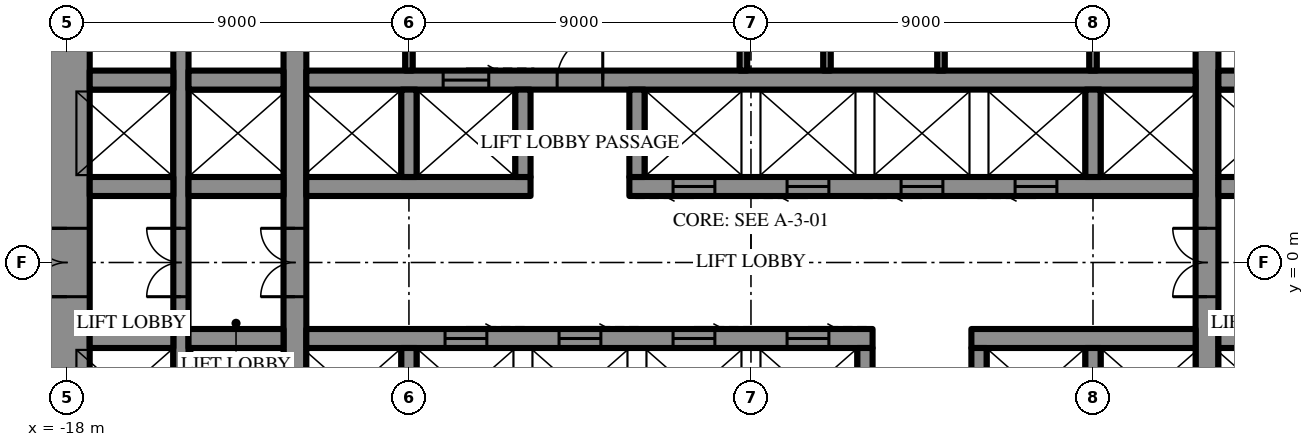
"""IFC4 building model, lengths in metres.
Left out: names, types, materials, properties, quantities, classifications, styles, units other than length and angle.
Written with IfcOpenShell. Run it as: python <this file> out.ifc"""

import sys

from ifc_helpers import new_model, si_unit, direction, frame, frame_2d, origin, place, context, subcontext, project, spatial, rectangle, extrude, element, fill, save


model = new_model("IFC4")
c1 = context("Model", 3, precision=1e-05, world=origin(), true_north=direction((0.0, 1.0)))
c2 = subcontext(c1, "Body", "Model", "MODEL_VIEW")
j1 = project(units=[si_unit("LENGTHUNIT", "METRE"), si_unit("PLANEANGLEUNIT", "RADIAN")], contexts=[c1])
p1 = place(None, origin())
s1 = spatial("IfcSite", under=j1, at=p1, CompositionType="ELEMENT")
p2 = place(p1, origin())
s2 = spatial("IfcBuilding", under=s1, at=p2, CompositionType="ELEMENT")
p3 = place(p2, frame((0.0, 0.0, 73.9)))
s3 = spatial("IfcBuildingStorey", under=s2, at=p3, CompositionType="ELEMENT", Elevation=73.9)
p4 = place(p3, frame((-18.0, 10.7, 0.0), z_axis=(0.0, 0.0, 1.0), x_axis=(0.0, -1.0, 0.0)))
e1 = element("IfcWall", 1, at=p4, inside=s3, PredefinedType="SHEAR", context=c2, shape_type="SweptSolid", body=[
    extrude(rectangle(XDim=21.4, YDim=1.2, at=frame_2d((10.7, 0.0))), origin(), (0.0, 0.0, 1.0), 4.2),
])
p5 = place(p4, frame((9.8, 0.0, 0.0)))
e2 = element("IfcOpeningElement", 2, at=p5, cuts=e1, PredefinedType="OPENING", context=c2, shape_type="SweptSolid", body=[
    extrude(rectangle(XDim=1.8, YDim=2.4, at=frame_2d((0.9, 1.2))), frame((0.0, 0.61, 0.0), z_axis=(0.0, -1.0, 0.0), x_axis=(1.0, 0.0, 0.0)), (0.0, 0.0, 1.0), 1.22),
])
p6 = place(p3, frame((12.0, -10.7, 0.0), z_axis=(0.0, 0.0, 1.0), x_axis=(0.0, 1.0, 0.0)))
e3 = element("IfcWall", 3, at=p6, inside=s3, PredefinedType="SHEAR", context=c2, shape_type="SweptSolid", body=[
    extrude(rectangle(XDim=21.4, YDim=0.6, at=frame_2d((10.7, 0.0))), origin(), (0.0, 0.0, 1.0), 4.2),
])
p7 = place(p6, frame((9.8, 0.0, 0.0)))
e4 = element("IfcOpeningElement", 4, at=p7, cuts=e3, PredefinedType="OPENING", context=c2, shape_type="SweptSolid", body=[
    extrude(rectangle(XDim=1.8, YDim=2.4, at=frame_2d((0.9, 1.2))), frame((0.0, 0.31, 0.0), z_axis=(0.0, -1.0, 0.0), x_axis=(1.0, 0.0, 0.0)), (0.0, 0.0, 1.0), 0.62),
])
p8 = place(p3, frame((-12.0, -10.7, 0.0), z_axis=(0.0, 0.0, 1.0), x_axis=(0.0, 1.0, 0.0)))
e5 = element("IfcWall", 5, at=p8, inside=s3, PredefinedType="SHEAR", context=c2, shape_type="SweptSolid", body=[
    extrude(rectangle(XDim=21.4, YDim=0.6, at=frame_2d((10.7, 0.0))), origin(), (0.0, 0.0, 1.0), 4.2),
])
p9 = place(p8, frame((9.8, 0.0, 0.0)))
e6 = element("IfcOpeningElement", 6, at=p9, cuts=e5, PredefinedType="OPENING", context=c2, shape_type="SweptSolid", body=[
    extrude(rectangle(XDim=1.8, YDim=2.4, at=frame_2d((0.9, 1.2))), frame((0.0, 0.31, 0.0), z_axis=(0.0, -1.0, 0.0), x_axis=(1.0, 0.0, 0.0)), (0.0, 0.0, 1.0), 0.62),
])
p10 = place(p3, frame((-15.0, -10.7, 0.0), z_axis=(0.0, 0.0, 1.0), x_axis=(0.0, 1.0, 0.0)))
e7 = element("IfcWall", 7, at=p10, inside=s3, PredefinedType="SHEAR", context=c2, shape_type="SweptSolid", body=[
    extrude(rectangle(XDim=21.4, YDim=0.4, at=frame_2d((10.7, 0.0))), origin(), (0.0, 0.0, 1.0), 4.2),
])
p11 = place(p10, frame((9.8, 0.0, 0.0)))
e8 = element("IfcOpeningElement", 8, at=p11, cuts=e7, PredefinedType="OPENING", context=c2, shape_type="SweptSolid", body=[
    extrude(rectangle(XDim=1.8, YDim=2.4, at=frame_2d((0.9, 1.2))), frame((0.0, 0.21, 0.0), z_axis=(0.0, -1.0, 0.0), x_axis=(1.0, 0.0, 0.0)), (0.0, 0.0, 1.0), 0.42),
])
p12 = place(p3, frame((-17.4, 2.0, 0.0), z_axis=(0.0, 0.0, 1.0), x_axis=(1.0, 0.0, 0.0)))
e9 = element("IfcWall", 9, at=p12, inside=s3, PredefinedType="SHEAR", context=c2, shape_type="SweptSolid", body=[
    extrude(rectangle(XDim=2.2, YDim=0.5, at=frame_2d((1.1, 0.0))), origin(), (0.0, 0.0, 1.0), 4.2),
])
p13 = place(p3, frame((-14.8, 2.0, 0.0), z_axis=(0.0, 0.0, 1.0), x_axis=(1.0, 0.0, 0.0)))
e10 = element("IfcWall", 10, at=p13, inside=s3, PredefinedType="SHEAR", context=c2, shape_type="SweptSolid", body=[
    extrude(rectangle(XDim=2.5, YDim=0.5, at=frame_2d((1.25, 0.0))), origin(), (0.0, 0.0, 1.0), 4.2),
])
p14 = place(p3, frame((-11.7, 2.0, 0.0), z_axis=(0.0, 0.0, 1.0), x_axis=(1.0, 0.0, 0.0)))
e11 = element("IfcWall", 11, at=p14, inside=s3, PredefinedType="SHEAR", context=c2, shape_type="SweptSolid", body=[
    extrude(rectangle(XDim=5.9, YDim=0.5, at=frame_2d((2.95, 0.0))), origin(), (0.0, 0.0, 1.0), 4.2),
])
p15 = place(p3, frame((-3.2, 2.0, 0.0), z_axis=(0.0, 0.0, 1.0), x_axis=(1.0, 0.0, 0.0)))
e12 = element("IfcWall", 12, at=p15, inside=s3, PredefinedType="SHEAR", context=c2, shape_type="SweptSolid", body=[
    extrude(rectangle(XDim=14.9, YDim=0.5, at=frame_2d((7.45, 0.0))), origin(), (0.0, 0.0, 1.0), 4.2),
])
p16 = place(p15, frame((1.15, 0.0, 0.0)))
e13 = element("IfcOpeningElement", 13, at=p16, cuts=e12, PredefinedType="OPENING", context=c2, shape_type="SweptSolid", body=[
    extrude(rectangle(XDim=1.1, YDim=2.2, at=frame_2d((0.55, 1.1))), frame((0.0, 0.26, 0.0), z_axis=(0.0, -1.0, 0.0), x_axis=(1.0, 0.0, 0.0)), (0.0, 0.0, 1.0), 0.52),
])
p17 = place(p15, frame((4.15, 0.0, 0.0)))
e14 = element("IfcOpeningElement", 14, at=p17, cuts=e12, PredefinedType="OPENING", context=c2, shape_type="SweptSolid", body=[
    extrude(rectangle(XDim=1.1, YDim=2.2, at=frame_2d((0.55, 1.1))), frame((0.0, 0.26, 0.0), z_axis=(0.0, -1.0, 0.0), x_axis=(1.0, 0.0, 0.0)), (0.0, 0.0, 1.0), 0.52),
])
p18 = place(p15, frame((7.15, 0.0, 0.0)))
e15 = element("IfcOpeningElement", 15, at=p18, cuts=e12, PredefinedType="OPENING", context=c2, shape_type="SweptSolid", body=[
    extrude(rectangle(XDim=1.1, YDim=2.2, at=frame_2d((0.55, 1.1))), frame((0.0, 0.26, 0.0), z_axis=(0.0, -1.0, 0.0), x_axis=(1.0, 0.0, 0.0)), (0.0, 0.0, 1.0), 0.52),
])
p19 = place(p15, frame((10.15, 0.0, 0.0)))
e16 = element("IfcOpeningElement", 16, at=p19, cuts=e12, PredefinedType="OPENING", context=c2, shape_type="SweptSolid", body=[
    extrude(rectangle(XDim=1.1, YDim=2.2, at=frame_2d((0.55, 1.1))), frame((0.0, 0.26, 0.0), z_axis=(0.0, -1.0, 0.0), x_axis=(1.0, 0.0, 0.0)), (0.0, 0.0, 1.0), 0.52),
])
p20 = place(p3, frame((12.3, 2.0, 0.0), z_axis=(0.0, 0.0, 1.0), x_axis=(1.0, 0.0, 0.0)))
e17 = element("IfcWall", 17, at=p20, inside=s3, PredefinedType="SHEAR", context=c2, shape_type="SweptSolid", body=[
    extrude(rectangle(XDim=2.5, YDim=0.5, at=frame_2d((1.25, 0.0))), origin(), (0.0, 0.0, 1.0), 4.2),
])
p21 = place(p3, frame((-17.4, 4.8, 0.0), z_axis=(0.0, 0.0, 1.0), x_axis=(1.0, 0.0, 0.0)))
e18 = element("IfcWall", 18, at=p21, inside=s3, PredefinedType="SHEAR", context=c2, shape_type="SweptSolid", body=[
    extrude(rectangle(XDim=2.2, YDim=0.5, at=frame_2d((1.1, 0.0))), origin(), (0.0, 0.0, 1.0), 4.2),
])
p22 = place(p3, frame((-14.8, 4.8, 0.0), z_axis=(0.0, 0.0, 1.0), x_axis=(1.0, 0.0, 0.0)))
e19 = element("IfcWall", 19, at=p22, inside=s3, PredefinedType="SHEAR", context=c2, shape_type="SweptSolid", body=[
    extrude(rectangle(XDim=2.5, YDim=0.5, at=frame_2d((1.25, 0.0))), origin(), (0.0, 0.0, 1.0), 4.2),
])
p23 = place(p3, frame((-11.7, 4.8, 0.0), z_axis=(0.0, 0.0, 1.0), x_axis=(1.0, 0.0, 0.0)))
e20 = element("IfcWall", 20, at=p23, inside=s3, PredefinedType="SHEAR", context=c2, shape_type="SweptSolid", body=[
    extrude(rectangle(XDim=23.4, YDim=0.5, at=frame_2d((11.7, 0.0))), origin(), (0.0, 0.0, 1.0), 4.2),
])
p24 = place(p23, frame((6.6, 0.0, 0.0)))
e21 = element("IfcOpeningElement", 21, at=p24, cuts=e20, PredefinedType="OPENING", context=c2, shape_type="SweptSolid", body=[
    extrude(rectangle(XDim=1.2, YDim=2.2, at=frame_2d((0.6, 1.1))), frame((0.0, 0.26, 0.0), z_axis=(0.0, -1.0, 0.0), x_axis=(1.0, 0.0, 0.0)), (0.0, 0.0, 1.0), 0.52),
])
p25 = place(p23, frame((3.6, 0.0, 0.0)))
e22 = element("IfcOpeningElement", 22, at=p25, cuts=e20, PredefinedType="OPENING", context=c2, shape_type="SweptSolid", body=[
    extrude(rectangle(XDim=1.2, YDim=2.2, at=frame_2d((0.6, 1.1))), frame((0.0, 0.26, 0.0), z_axis=(0.0, -1.0, 0.0), x_axis=(1.0, 0.0, 0.0)), (0.0, 0.0, 1.0), 0.52),
])
p26 = place(p3, frame((12.3, 4.8, 0.0), z_axis=(0.0, 0.0, 1.0), x_axis=(1.0, 0.0, 0.0)))
e23 = element("IfcWall", 23, at=p26, inside=s3, PredefinedType="SHEAR", context=c2, shape_type="SweptSolid", body=[
    extrude(rectangle(XDim=2.5, YDim=0.5, at=frame_2d((1.25, 0.0))), origin(), (0.0, 0.0, 1.0), 4.2),
])
for number, where, z_axis, x_axis in (
    (24, (-9.0, 2.25, 0.0), (0.0, 0.0, 1.0), (0.0, 1.0, 0.0)),
    (25, (-6.0, 2.25, 0.0), (0.0, 0.0, 1.0), (0.0, 1.0, 0.0)),
    (26, (-3.0, 2.25, 0.0), (0.0, 0.0, 1.0), (0.0, 1.0, 0.0)),
    (27, (9.0, 2.25, 0.0), (0.0, 0.0, 1.0), (0.0, 1.0, 0.0)),
):
    element("IfcWall", number, at=place(p3, frame(where, z_axis=z_axis, x_axis=x_axis)), inside=s3, PredefinedType="SHEAR", context=c2, shape_type="SweptSolid", body=[
        extrude(rectangle(XDim=2.3, YDim=0.4, at=frame_2d((1.15, 0.0))), origin(), (0.0, 0.0, 1.0), 4.2),
    ])
p27 = place(p3, frame((-0.2, 5.05, 0.0), z_axis=(0.0, 0.0, 1.0), x_axis=(0.0, 1.0, 0.0)))
e28 = element("IfcWall", 28, at=p27, inside=s3, PredefinedType="SHEAR", context=c2, shape_type="SweptSolid", body=[
    extrude(rectangle(XDim=5.65, YDim=0.2, at=frame_2d((2.825, 0.0))), origin(), (0.0, 0.0, 1.0), 4.2),
])
p28 = place(p3, frame((14.8, -2.0, 0.0), z_axis=(0.0, 0.0, 1.0), x_axis=(-1.0, 0.0, 0.0)))
e29 = element("IfcWall", 29, at=p28, inside=s3, PredefinedType="SHEAR", context=c2, shape_type="SweptSolid", body=[
    extrude(rectangle(XDim=2.5, YDim=0.5, at=frame_2d((1.25, 0.0))), origin(), (0.0, 0.0, 1.0), 4.2),
])
p29 = place(p3, frame((11.7, -2.0, 0.0), z_axis=(0.0, 0.0, 1.0), x_axis=(-1.0, 0.0, 0.0)))
e30 = element("IfcWall", 30, at=p29, inside=s3, PredefinedType="SHEAR", context=c2, shape_type="SweptSolid", body=[
    extrude(rectangle(XDim=5.9, YDim=0.5, at=frame_2d((2.95, 0.0))), origin(), (0.0, 0.0, 1.0), 4.2),
])
p30 = place(p3, frame((3.2, -2.0, 0.0), z_axis=(0.0, 0.0, 1.0), x_axis=(-1.0, 0.0, 0.0)))
e31 = element("IfcWall", 31, at=p30, inside=s3, PredefinedType="SHEAR", context=c2, shape_type="SweptSolid", body=[
    extrude(rectangle(XDim=14.9, YDim=0.5, at=frame_2d((7.45, 0.0))), origin(), (0.0, 0.0, 1.0), 4.2),
])
p31 = place(p30, frame((1.15, 0.0, 0.0)))
e32 = element("IfcOpeningElement", 32, at=p31, cuts=e31, PredefinedType="OPENING", context=c2, shape_type="SweptSolid", body=[
    extrude(rectangle(XDim=1.1, YDim=2.2, at=frame_2d((0.55, 1.1))), frame((0.0, 0.26, 0.0), z_axis=(0.0, -1.0, 0.0), x_axis=(1.0, 0.0, 0.0)), (0.0, 0.0, 1.0), 0.52),
])
p32 = place(p30, frame((4.15, 0.0, 0.0)))
e33 = element("IfcOpeningElement", 33, at=p32, cuts=e31, PredefinedType="OPENING", context=c2, shape_type="SweptSolid", body=[
    extrude(rectangle(XDim=1.1, YDim=2.2, at=frame_2d((0.55, 1.1))), frame((0.0, 0.26, 0.0), z_axis=(0.0, -1.0, 0.0), x_axis=(1.0, 0.0, 0.0)), (0.0, 0.0, 1.0), 0.52),
])
p33 = place(p30, frame((7.15, 0.0, 0.0)))
e34 = element("IfcOpeningElement", 34, at=p33, cuts=e31, PredefinedType="OPENING", context=c2, shape_type="SweptSolid", body=[
    extrude(rectangle(XDim=1.1, YDim=2.2, at=frame_2d((0.55, 1.1))), frame((0.0, 0.26, 0.0), z_axis=(0.0, -1.0, 0.0), x_axis=(1.0, 0.0, 0.0)), (0.0, 0.0, 1.0), 0.52),
])
p34 = place(p30, frame((10.15, 0.0, 0.0)))
e35 = element("IfcOpeningElement", 35, at=p34, cuts=e31, PredefinedType="OPENING", context=c2, shape_type="SweptSolid", body=[
    extrude(rectangle(XDim=1.1, YDim=2.2, at=frame_2d((0.55, 1.1))), frame((0.0, 0.26, 0.0), z_axis=(0.0, -1.0, 0.0), x_axis=(1.0, 0.0, 0.0)), (0.0, 0.0, 1.0), 0.52),
])
p35 = place(p3, frame((-12.3, -2.0, 0.0), z_axis=(0.0, 0.0, 1.0), x_axis=(-1.0, 0.0, 0.0)))
e36 = element("IfcWall", 36, at=p35, inside=s3, PredefinedType="SHEAR", context=c2, shape_type="SweptSolid", body=[
    extrude(rectangle(XDim=2.5, YDim=0.5, at=frame_2d((1.25, 0.0))), origin(), (0.0, 0.0, 1.0), 4.2),
])
p36 = place(p3, frame((-15.2, -2.0, 0.0), z_axis=(0.0, 0.0, 1.0), x_axis=(-1.0, 0.0, 0.0)))
e37 = element("IfcWall", 37, at=p36, inside=s3, PredefinedType="SHEAR", context=c2, shape_type="SweptSolid", body=[
    extrude(rectangle(XDim=2.2, YDim=0.5, at=frame_2d((1.1, 0.0))), origin(), (0.0, 0.0, 1.0), 4.2),
])
for number, where, z_axis, x_axis in (
    (38, (9.0, -2.25, 0.0), (0.0, 0.0, 1.0), (0.0, -1.0, 0.0)),
    (39, (6.0, -2.25, 0.0), (0.0, 0.0, 1.0), (0.0, -1.0, 0.0)),
    (40, (3.0, -2.25, 0.0), (0.0, 0.0, 1.0), (0.0, -1.0, 0.0)),
    (41, (-9.0, -2.25, 0.0), (0.0, 0.0, 1.0), (0.0, -1.0, 0.0)),
):
    element("IfcWall", number, at=place(p3, frame(where, z_axis=z_axis, x_axis=x_axis)), inside=s3, PredefinedType="SHEAR", context=c2, shape_type="SweptSolid", body=[
        extrude(rectangle(XDim=2.3, YDim=0.4, at=frame_2d((1.15, 0.0))), origin(), (0.0, 0.0, 1.0), 4.2),
    ])
for number, where, z_axis, x_axis in (
    (42, (-9.0, 5.05, 0.0), (0.0, 0.0, 1.0), (0.0, 1.0, 0.0)),
    (43, (9.0, 5.05, 0.0), (0.0, 0.0, 1.0), (0.0, 1.0, 0.0)),
    (44, (2.0, 5.05, 0.0), (0.0, 0.0, 1.0), (0.0, 1.0, 0.0)),
    (45, (5.0, 5.05, 0.0), (0.0, 0.0, 1.0), (0.0, 1.0, 0.0)),
):
    element("IfcWall", number, at=place(p3, frame(where, z_axis=z_axis, x_axis=x_axis)), inside=s3, PredefinedType="PARTITIONING", context=c2, shape_type="SweptSolid", body=[
        extrude(rectangle(XDim=5.65, YDim=0.2, at=frame_2d((2.825, 0.0))), origin(), (0.0, 0.0, 1.0), 4.0),
    ])
p37 = place(p5, frame((1.8, 0.0, 0.0), z_axis=(0.0, 0.0, 1.0), x_axis=(-1.0, 0.0, 0.0)))
e46 = element("IfcDoor", 46, at=p37, inside=s3, OperationType="DOUBLE_DOOR_SINGLE_SWING", PredefinedType="DOOR", context=c2, shape_type="SweptSolid", body=[
    extrude(rectangle(XDim=1.8, YDim=2.4, at=frame_2d((0.9, 1.2))), frame((0.0, 0.025, 0.0), z_axis=(0.0, -1.0, 0.0), x_axis=(1.0, 0.0, 0.0)), (0.0, 0.0, 1.0), 0.05),
])
fill(e2, e46)
p38 = place(p24, origin())
e47 = element("IfcDoor", 47, at=p38, inside=s3, OperationType="SINGLE_SWING_LEFT", PredefinedType="DOOR", context=c2, shape_type="SweptSolid", body=[
    extrude(rectangle(XDim=1.2, YDim=2.2, at=frame_2d((0.6, 1.1))), frame((0.0, 0.025, 0.0), z_axis=(0.0, -1.0, 0.0), x_axis=(1.0, 0.0, 0.0)), (0.0, 0.0, 1.0), 0.05),
])
fill(e21, e47)
p39 = place(p7, origin())
e48 = element("IfcDoor", 48, at=p39, inside=s3, OperationType="DOUBLE_DOOR_SINGLE_SWING", PredefinedType="DOOR", context=c2, shape_type="SweptSolid", body=[
    extrude(rectangle(XDim=1.8, YDim=2.4, at=frame_2d((0.9, 1.2))), frame((0.0, 0.025, 0.0), z_axis=(0.0, -1.0, 0.0), x_axis=(1.0, 0.0, 0.0)), (0.0, 0.0, 1.0), 0.05),
])
fill(e4, e48)
p40 = place(p9, origin())
e49 = element("IfcDoor", 49, at=p40, inside=s3, OperationType="DOUBLE_DOOR_SINGLE_SWING", PredefinedType="DOOR", context=c2, shape_type="SweptSolid", body=[
    extrude(rectangle(XDim=1.8, YDim=2.4, at=frame_2d((0.9, 1.2))), frame((0.0, 0.025, 0.0), z_axis=(0.0, -1.0, 0.0), x_axis=(1.0, 0.0, 0.0)), (0.0, 0.0, 1.0), 0.05),
])
fill(e6, e49)
p41 = place(p11, origin())
e50 = element("IfcDoor", 50, at=p41, inside=s3, OperationType="DOUBLE_DOOR_SINGLE_SWING", PredefinedType="DOOR", context=c2, shape_type="SweptSolid", body=[
    extrude(rectangle(XDim=1.8, YDim=2.4, at=frame_2d((0.9, 1.2))), frame((0.0, 0.025, 0.0), z_axis=(0.0, -1.0, 0.0), x_axis=(1.0, 0.0, 0.0)), (0.0, 0.0, 1.0), 0.05),
])
fill(e8, e50)
p42 = place(p25, origin())
e51 = element("IfcDoor", 51, at=p42, inside=s3, OperationType="SLIDING_TO_LEFT", PredefinedType="DOOR", context=c2, shape_type="SweptSolid", body=[
    extrude(rectangle(XDim=1.2, YDim=2.2, at=frame_2d((0.6, 1.1))), frame((0.0, 0.025, 0.0), z_axis=(0.0, -1.0, 0.0), x_axis=(1.0, 0.0, 0.0)), (0.0, 0.0, 1.0), 0.05),
])
fill(e22, e51)
p43 = place(p16, frame((1.1, 0.0, 0.0), z_axis=(0.0, 0.0, 1.0), x_axis=(-1.0, 0.0, 0.0)))
e52 = element("IfcDoor", 52, at=p43, inside=s3, OperationType="SLIDING_TO_LEFT", PredefinedType="DOOR", context=c2, shape_type="SweptSolid", body=[
    extrude(rectangle(XDim=1.1, YDim=2.2, at=frame_2d((0.55, 1.1))), frame((0.0, 0.025, 0.0), z_axis=(0.0, -1.0, 0.0), x_axis=(1.0, 0.0, 0.0)), (0.0, 0.0, 1.0), 0.05),
])
fill(e13, e52)
p44 = place(p17, frame((1.1, 0.0, 0.0), z_axis=(0.0, 0.0, 1.0), x_axis=(-1.0, 0.0, 0.0)))
e53 = element("IfcDoor", 53, at=p44, inside=s3, OperationType="SLIDING_TO_LEFT", PredefinedType="DOOR", context=c2, shape_type="SweptSolid", body=[
    extrude(rectangle(XDim=1.1, YDim=2.2, at=frame_2d((0.55, 1.1))), frame((0.0, 0.025, 0.0), z_axis=(0.0, -1.0, 0.0), x_axis=(1.0, 0.0, 0.0)), (0.0, 0.0, 1.0), 0.05),
])
fill(e14, e53)
p45 = place(p18, frame((1.1, 0.0, 0.0), z_axis=(0.0, 0.0, 1.0), x_axis=(-1.0, 0.0, 0.0)))
e54 = element("IfcDoor", 54, at=p45, inside=s3, OperationType="SLIDING_TO_LEFT", PredefinedType="DOOR", context=c2, shape_type="SweptSolid", body=[
    extrude(rectangle(XDim=1.1, YDim=2.2, at=frame_2d((0.55, 1.1))), frame((0.0, 0.025, 0.0), z_axis=(0.0, -1.0, 0.0), x_axis=(1.0, 0.0, 0.0)), (0.0, 0.0, 1.0), 0.05),
])
fill(e15, e54)
p46 = place(p19, frame((1.1, 0.0, 0.0), z_axis=(0.0, 0.0, 1.0), x_axis=(-1.0, 0.0, 0.0)))
e55 = element("IfcDoor", 55, at=p46, inside=s3, OperationType="SLIDING_TO_LEFT", PredefinedType="DOOR", context=c2, shape_type="SweptSolid", body=[
    extrude(rectangle(XDim=1.1, YDim=2.2, at=frame_2d((0.55, 1.1))), frame((0.0, 0.025, 0.0), z_axis=(0.0, -1.0, 0.0), x_axis=(1.0, 0.0, 0.0)), (0.0, 0.0, 1.0), 0.05),
])
fill(e16, e55)
p47 = place(p31, frame((1.1, 0.0, 0.0), z_axis=(0.0, 0.0, 1.0), x_axis=(-1.0, 0.0, 0.0)))
e56 = element("IfcDoor", 56, at=p47, inside=s3, OperationType="SLIDING_TO_LEFT", PredefinedType="DOOR", context=c2, shape_type="SweptSolid", body=[
    extrude(rectangle(XDim=1.1, YDim=2.2, at=frame_2d((0.55, 1.1))), frame((0.0, 0.025, 0.0), z_axis=(0.0, -1.0, 0.0), x_axis=(1.0, 0.0, 0.0)), (0.0, 0.0, 1.0), 0.05),
])
fill(e32, e56)
p48 = place(p32, frame((1.1, 0.0, 0.0), z_axis=(0.0, 0.0, 1.0), x_axis=(-1.0, 0.0, 0.0)))
e57 = element("IfcDoor", 57, at=p48, inside=s3, OperationType="SLIDING_TO_LEFT", PredefinedType="DOOR", context=c2, shape_type="SweptSolid", body=[
    extrude(rectangle(XDim=1.1, YDim=2.2, at=frame_2d((0.55, 1.1))), frame((0.0, 0.025, 0.0), z_axis=(0.0, -1.0, 0.0), x_axis=(1.0, 0.0, 0.0)), (0.0, 0.0, 1.0), 0.05),
])
fill(e33, e57)
p49 = place(p33, frame((1.1, 0.0, 0.0), z_axis=(0.0, 0.0, 1.0), x_axis=(-1.0, 0.0, 0.0)))
e58 = element("IfcDoor", 58, at=p49, inside=s3, OperationType="SLIDING_TO_LEFT", PredefinedType="DOOR", context=c2, shape_type="SweptSolid", body=[
    extrude(rectangle(XDim=1.1, YDim=2.2, at=frame_2d((0.55, 1.1))), frame((0.0, 0.025, 0.0), z_axis=(0.0, -1.0, 0.0), x_axis=(1.0, 0.0, 0.0)), (0.0, 0.0, 1.0), 0.05),
])
fill(e34, e58)
p50 = place(p34, frame((1.1, 0.0, 0.0), z_axis=(0.0, 0.0, 1.0), x_axis=(-1.0, 0.0, 0.0)))
e59 = element("IfcDoor", 59, at=p50, inside=s3, OperationType="SLIDING_TO_LEFT", PredefinedType="DOOR", context=c2, shape_type="SweptSolid", body=[
    extrude(rectangle(XDim=1.1, YDim=2.2, at=frame_2d((0.55, 1.1))), frame((0.0, 0.025, 0.0), z_axis=(0.0, -1.0, 0.0), x_axis=(1.0, 0.0, 0.0)), (0.0, 0.0, 1.0), 0.05),
])
fill(e35, e59)
save(model, sys.argv[1])
